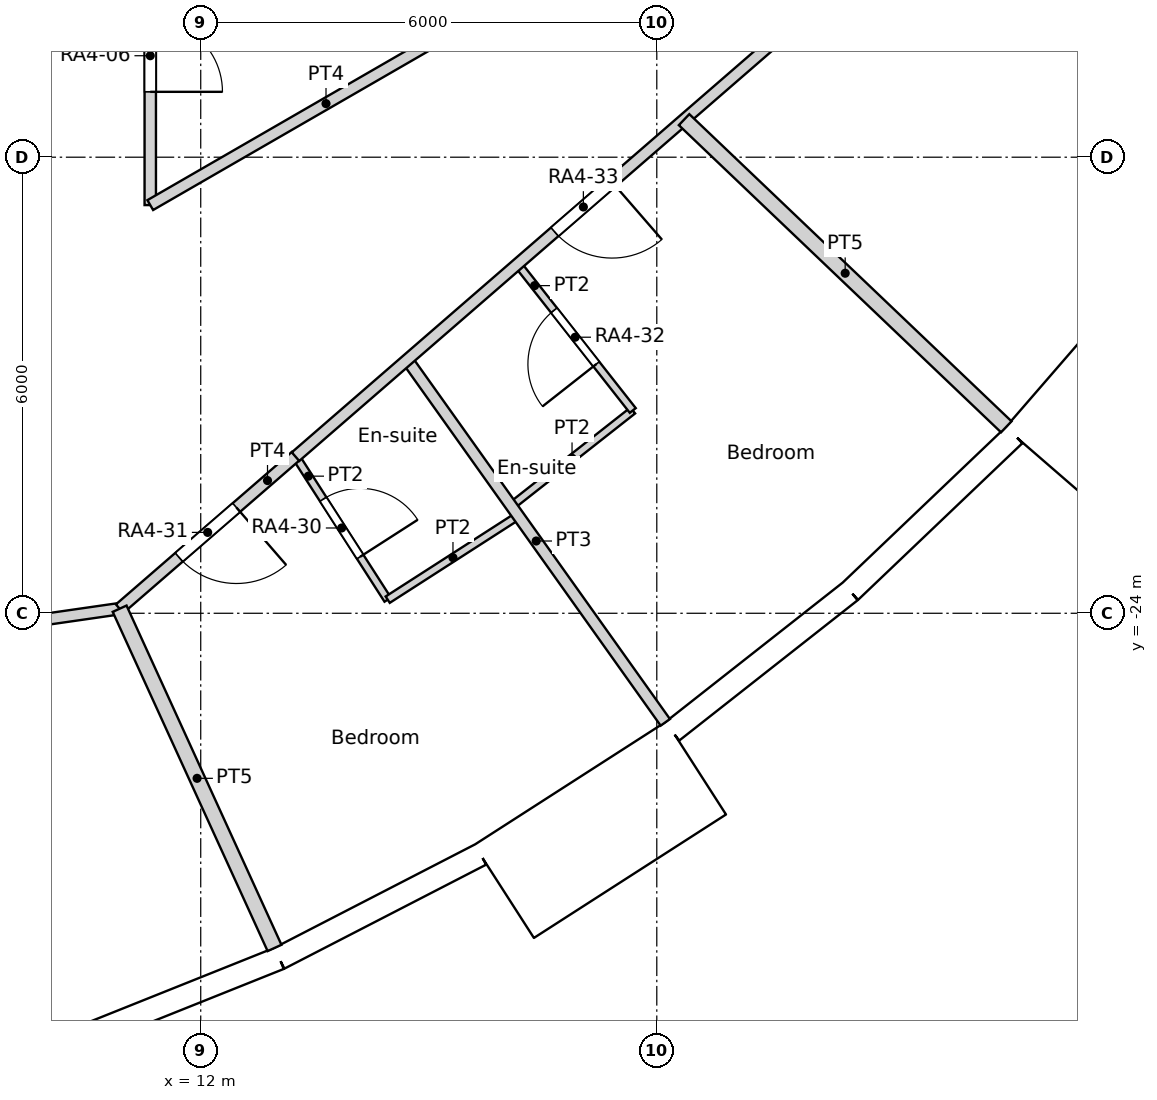
"""IFC4 building model, lengths in metres.
Left out: names, types, materials, properties, quantities, classifications, styles, units other than length and angle.
Written with IfcOpenShell. Run it as: python <this file> out.ifc"""

import sys

from ifc_helpers import new_model, si_unit, direction, frame, frame_2d, origin, origin_2d, place, context, subcontext, project, spatial, rectangle, circle, extrude, element, fill, save


model = new_model("IFC4")
c1 = context("Model", 3, precision=1e-05, world=origin(), true_north=direction((0.0, 1.0)))
c2 = subcontext(c1, "Body", "Model", "MODEL_VIEW")
j1 = project(units=[si_unit("LENGTHUNIT", "METRE"), si_unit("PLANEANGLEUNIT", "RADIAN")], contexts=[c1])
p1 = place(None, origin())
s1 = spatial("IfcSite", under=j1, at=p1, CompositionType="ELEMENT")
p2 = place(p1, origin())
s2 = spatial("IfcBuilding", under=s1, at=p2, CompositionType="ELEMENT")
p3 = place(p2, frame((0.0, 0.0, 60.6)))
s3 = spatial("IfcBuildingStorey", under=s2, at=p3, CompositionType="ELEMENT", Elevation=60.6)
for number, where, z_axis, x_axis in (
    (1, (12.576, -27.539, 0.0), (0.0, 0.0, 1.0), (1.0, 0.0, 0.0)),
    (2, (17.561, -24.661, 0.0), (0.0, 0.0, 1.0), (1.0, 0.0, 0.0)),
    (3, (21.911, -20.892, 0.0), (0.0, 0.0, 1.0), (1.0, 0.0, 0.0)),
):
    element("IfcColumn", number, at=place(p3, frame(where, z_axis=z_axis, x_axis=x_axis)), inside=s3, PredefinedType="COLUMN", context=c2, shape_type="SweptSolid", body=[
        extrude(circle(Radius=0.7, at=origin_2d()), origin(), (0.0, 0.0, 1.0), 3.6),
    ])
for number, where, z_axis, x_axis in (
    (4, (9.723, -22.54, 0.0), (0.0, 0.0, 1.0), (1.0, 0.0, 0.0)),
    (5, (14.659, -19.69, 0.0), (0.0, 0.0, 1.0), (1.0, 0.0, 0.0)),
):
    element("IfcColumn", number, at=place(p3, frame(where, z_axis=z_axis, x_axis=x_axis)), inside=s3, PredefinedType="COLUMN", context=c2, shape_type="SweptSolid", body=[
        extrude(circle(Radius=0.75, at=origin_2d()), origin(), (0.0, 0.0, 1.0), 3.6),
    ])
p4 = place(p3, frame((10.267, -29.646, 0.0), z_axis=(0.0, 0.0, 1.0), x_axis=(0.928403213937, 0.371574316054, 0.0)))
e6 = element("IfcWall", 6, at=p4, inside=s3, PredefinedType="SOLIDWALL", context=c2, shape_type="SweptSolid", body=[
    extrude(rectangle(XDim=2.98, YDim=0.3, at=frame_2d((1.49, 0.0))), origin(), (0.0, 0.0, 1.0), 2.65),
])
p5 = place(p4, frame((1.49, 0.0, 1.55)))
e7 = element("IfcOpeningElement", 7, at=p5, cuts=e6, PredefinedType="OPENING", context=c2, shape_type="SweptSolid", body=[
    extrude(circle(Radius=0.9, at=origin_2d()), frame((0.0, 0.16, 0.0), z_axis=(0.0, -1.0, 0.0), x_axis=(1.0, 0.0, 0.0)), (0.0, 0.0, 1.0), 0.32),
])
p6 = place(p3, frame((13.033, -28.539, 0.0), z_axis=(0.0, 0.0, 1.0), x_axis=(0.888819853856, 0.458256770153, 0.0)))
e8 = element("IfcWall", 8, at=p6, inside=s3, PredefinedType="SOLIDWALL", context=c2, shape_type="SweptSolid", body=[
    extrude(rectangle(XDim=2.98, YDim=0.3, at=frame_2d((1.49, 0.0))), origin(), (0.0, 0.0, 1.0), 3.15),
])
p7 = place(p6, frame((1.49, 0.0, 1.55)))
e9 = element("IfcOpeningElement", 9, at=p7, cuts=e8, PredefinedType="OPENING", context=c2, shape_type="SweptSolid", body=[
    extrude(circle(Radius=0.9, at=origin_2d()), frame((0.0, 0.16, 0.0), z_axis=(0.0, -1.0, 0.0), x_axis=(1.0, 0.0, 0.0)), (0.0, 0.0, 1.0), 0.32),
])
p8 = place(p3, frame((15.992, -27.659, -0.45), z_axis=(0.0, 0.0, 1.0), x_axis=(0.841223422347, 0.540687667415, 0.0)))
e10 = element("IfcWall", 10, at=p8, inside=s3, PredefinedType="ELEMENTEDWALL", context=c2, shape_type="SweptSolid", body=[
    extrude(rectangle(XDim=3.0, YDim=1.45, at=frame_2d((1.5, 0.0))), origin(), (0.0, 0.0, 1.0), 3.6),
])
p9 = place(p8, frame((1.5, 0.0, 2.0)))
e11 = element("IfcOpeningElement", 11, at=p9, cuts=e10, PredefinedType="OPENING", context=c2, shape_type="SweptSolid", body=[
    extrude(circle(Radius=0.9, at=origin_2d()), frame((0.0, 0.735, 0.0), z_axis=(0.0, -1.0, 0.0), x_axis=(1.0, 0.0, 0.0)), (0.0, 0.0, 1.0), 1.47),
])
p10 = place(p3, frame((18.204, -25.553, 0.0), z_axis=(0.0, 0.0, 1.0), x_axis=(0.786045331304, 0.618168858108, 0.0)))
e12 = element("IfcWall", 12, at=p10, inside=s3, PredefinedType="SOLIDWALL", context=c2, shape_type="SweptSolid", body=[
    extrude(rectangle(XDim=2.98, YDim=0.3, at=frame_2d((1.49, 0.0))), origin(), (0.0, 0.0, 1.0), 2.65),
])
p11 = place(p10, frame((1.49, 0.0, 1.55)))
e13 = element("IfcOpeningElement", 13, at=p11, cuts=e12, PredefinedType="OPENING", context=c2, shape_type="SweptSolid", body=[
    extrude(circle(Radius=0.9, at=origin_2d()), frame((0.0, 0.16, 0.0), z_axis=(0.0, -1.0, 0.0), x_axis=(1.0, 0.0, 0.0)), (0.0, 0.0, 1.0), 0.32),
])
p12 = place(p3, frame((20.546, -23.711, 0.0), z_axis=(0.0, 0.0, 1.0), x_axis=(0.723744206617, 0.690068346896, 0.0)))
e14 = element("IfcWall", 14, at=p12, inside=s3, PredefinedType="SOLIDWALL", context=c2, shape_type="SweptSolid", body=[
    extrude(rectangle(XDim=2.98, YDim=0.3, at=frame_2d((1.49, 0.0))), origin(), (0.0, 0.0, 1.0), 3.15),
])
p13 = place(p12, frame((1.49, 0.0, 1.55)))
e15 = element("IfcOpeningElement", 15, at=p13, cuts=e14, PredefinedType="OPENING", context=c2, shape_type="SweptSolid", body=[
    extrude(circle(Radius=0.9, at=origin_2d()), frame((0.0, 0.16, 0.0), z_axis=(0.0, -1.0, 0.0), x_axis=(1.0, 0.0, 0.0)), (0.0, 0.0, 1.0), 0.32),
])
p14 = place(p3, frame((23.137, -22.033, -0.45), z_axis=(0.0, 0.0, 1.0), x_axis=(0.654890259022, 0.75572398972, 0.0)))
e16 = element("IfcWall", 16, at=p14, inside=s3, PredefinedType="ELEMENTEDWALL", context=c2, shape_type="SweptSolid", body=[
    extrude(rectangle(XDim=3.0, YDim=1.45, at=frame_2d((1.5, 0.0))), origin(), (0.0, 0.0, 1.0), 3.6),
])
p15 = place(p14, frame((1.5, 0.0, 2.0)))
e17 = element("IfcOpeningElement", 17, at=p15, cuts=e16, PredefinedType="OPENING", context=c2, shape_type="SweptSolid", body=[
    extrude(circle(Radius=0.9, at=origin_2d()), frame((0.0, 0.735, 0.0), z_axis=(0.0, -1.0, 0.0), x_axis=(1.0, 0.0, 0.0)), (0.0, 0.0, 1.0), 1.47),
])
p16 = place(p3, frame((13.247, -21.939, 0.0), z_axis=(0.0, 0.0, 1.0), x_axis=(0.755420750547, 0.655240024451, 0.0)))
e18 = element("IfcWall", 18, at=p16, inside=s3, PredefinedType="PARTITIONING", context=c2, shape_type="SweptSolid", body=[
    extrude(rectangle(XDim=11.771, YDim=0.15, at=frame_2d((5.885, 0.0))), origin(), (0.0, 0.0, 1.0), 3.15),
])
p17 = place(p16, frame((4.513, 0.0, 0.0)))
e19 = element("IfcOpeningElement", 19, at=p17, cuts=e18, PredefinedType="OPENING", context=c2, shape_type="SweptSolid", body=[
    extrude(rectangle(XDim=1.0, YDim=2.1, at=frame_2d((0.5, 1.05))), frame((0.0, 0.075, 0.0), z_axis=(0.0, -1.0, 0.0), x_axis=(1.0, 0.0, 0.0)), (0.0, 0.0, 1.0), 0.15),
])
p18 = place(p3, frame((11.336, -18.63, 0.0), z_axis=(0.0, 0.0, 1.0), x_axis=(0.0, 1.0, 0.0)))
e20 = element("IfcWall", 20, at=p18, inside=s3, PredefinedType="PARTITIONING", context=c2, shape_type="SweptSolid", body=[
    extrude(rectangle(XDim=6.83, YDim=0.15, at=frame_2d((3.415, 0.0))), origin(), (0.0, 0.0, 1.0), 3.15),
])
p19 = place(p18, frame((1.49, 0.0, 0.0)))
e21 = element("IfcOpeningElement", 21, at=p19, cuts=e20, PredefinedType="OPENING", context=c2, shape_type="SweptSolid", body=[
    extrude(rectangle(XDim=0.95, YDim=2.1, at=frame_2d((0.475, 1.05))), frame((0.0, 0.075, 0.0), z_axis=(0.0, -1.0, 0.0), x_axis=(1.0, 0.0, 0.0)), (0.0, 0.0, 1.0), 0.15),
])
p20 = place(p3, frame((11.336, -18.63, 0.0), z_axis=(0.0, 0.0, 1.0), x_axis=(0.866056911224, 0.499945423543, 0.0)))
e22 = element("IfcWall", 22, at=p20, inside=s3, PredefinedType="PARTITIONING", context=c2, shape_type="SweptSolid", body=[
    extrude(rectangle(XDim=5.339, YDim=0.15, at=frame_2d((2.67, 0.0))), origin(), (0.0, 0.0, 1.0), 3.15),
])
p21 = place(p3, frame((-3.746, -26.051, 0.0), z_axis=(0.0, 0.0, 1.0), x_axis=(0.9898137179, 0.142368549395, 0.0)))
e23 = element("IfcWall", 23, at=p21, inside=s3, PredefinedType="PARTITIONING", context=c2, shape_type="SweptSolid", body=[
    extrude(rectangle(XDim=14.83, YDim=0.15, at=frame_2d((7.415, 0.0))), origin(), (0.0, 0.0, 1.0), 3.15),
])
p22 = place(p21, frame((9.415, 0.0, 0.0)))
e24 = element("IfcOpeningElement", 24, at=p22, cuts=e23, PredefinedType="OPENING", context=c2, shape_type="SweptSolid", body=[
    extrude(rectangle(XDim=1.5, YDim=2.1, at=frame_2d((0.75, 1.05))), frame((0.0, 0.075, 0.0), z_axis=(0.0, -1.0, 0.0), x_axis=(1.0, 0.0, 0.0)), (0.0, 0.0, 1.0), 0.15),
])
p23 = place(p3, frame((10.933, -23.94, 0.0), z_axis=(0.0, 0.0, 1.0), x_axis=(0.755675945931, 0.654945696025, 0.0)))
e25 = element("IfcWall", 25, at=p23, inside=s3, PredefinedType="PARTITIONING", context=c2, shape_type="SweptSolid", body=[
    extrude(rectangle(XDim=3.066, YDim=0.15, at=frame_2d((1.533, 0.0))), origin(), (0.0, 0.0, 1.0), 3.15),
])
p24 = place(p23, frame((1.033, 0.0, 0.0)))
e26 = element("IfcOpeningElement", 26, at=p24, cuts=e25, PredefinedType="OPENING", context=c2, shape_type="SweptSolid", body=[
    extrude(rectangle(XDim=1.0, YDim=2.1, at=frame_2d((0.5, 1.05))), frame((0.0, 0.075, 0.0), z_axis=(0.0, -1.0, 0.0), x_axis=(1.0, 0.0, 0.0)), (0.0, 0.0, 1.0), 0.15),
])
p25 = place(p3, frame((10.933, -23.94, 0.0), z_axis=(0.0, 0.0, 1.0), x_axis=(0.415346954488, -0.909663073559, 0.0)))
e27 = element("IfcWall", 27, at=p25, inside=s3, PredefinedType="PARTITIONING", context=c2, shape_type="SweptSolid", body=[
    extrude(rectangle(XDim=4.906, YDim=0.2, at=frame_2d((2.453, 0.0))), origin(), (0.0, 0.0, 1.0), 3.15),
])
p26 = place(p3, frame((13.248, -21.935, 0.0), z_axis=(0.0, 0.0, 1.0), x_axis=(0.540597960994, -0.841281073464, 0.0)))
e28 = element("IfcWall", 28, at=p26, inside=s3, PredefinedType="PARTITIONING", context=c2, shape_type="SweptSolid", body=[
    extrude(rectangle(XDim=2.242, YDim=0.1, at=frame_2d((1.121, 0.0))), origin(), (0.0, 0.0, 1.0), 3.15),
])
p27 = place(p26, frame((0.671, 0.0, 0.0)))
e29 = element("IfcOpeningElement", 29, at=p27, cuts=e28, PredefinedType="OPENING", context=c2, shape_type="SweptSolid", body=[
    extrude(rectangle(XDim=0.9, YDim=2.04, at=frame_2d((0.45, 1.02))), frame((0.0, 0.05, 0.0), z_axis=(0.0, -1.0, 0.0), x_axis=(1.0, 0.0, 0.0)), (0.0, 0.0, 1.0), 0.1),
])
p28 = place(p3, frame((14.46, -23.821, 0.0), z_axis=(0.0, 0.0, 1.0), x_axis=(0.841135728185, 0.540824081168, 0.0)))
e30 = element("IfcWall", 30, at=p28, inside=s3, PredefinedType="PARTITIONING", context=c2, shape_type="SweptSolid", body=[
    extrude(rectangle(XDim=2.041, YDim=0.1, at=frame_2d((1.021, 0.0))), origin(), (0.0, 0.0, 1.0), 3.15),
])
p29 = place(p3, frame((14.715, -20.664, 0.0), z_axis=(0.0, 0.0, 1.0), x_axis=(0.57995989616, -0.814645026282, 0.0)))
e31 = element("IfcWall", 31, at=p29, inside=s3, PredefinedType="PARTITIONING", context=c2, shape_type="SweptSolid", body=[
    extrude(rectangle(XDim=5.857, YDim=0.15, at=frame_2d((2.928, 0.0))), origin(), (0.0, 0.0, 1.0), 3.15),
])
p30 = place(p3, frame((16.086, -22.589, 0.0), z_axis=(0.0, 0.0, 1.0), x_axis=(0.785984904201, 0.618245687707, 0.0)))
e32 = element("IfcWall", 32, at=p30, inside=s3, PredefinedType="PARTITIONING", context=c2, shape_type="SweptSolid", body=[
    extrude(rectangle(XDim=2.033, YDim=0.1, at=frame_2d((1.017, 0.0))), origin(), (0.0, 0.0, 1.0), 3.15),
])
p31 = place(p3, frame((16.168, -19.404, 0.0), z_axis=(0.0, 0.0, 1.0), x_axis=(0.618142414415, -0.786066126672, 0.0)))
e33 = element("IfcWall", 33, at=p31, inside=s3, PredefinedType="PARTITIONING", context=c2, shape_type="SweptSolid", body=[
    extrude(rectangle(XDim=2.453, YDim=0.1, at=frame_2d((1.226, 0.0))), origin(), (0.0, 0.0, 1.0), 3.15),
])
p32 = place(p31, frame((0.777, 0.0, 0.0)))
e34 = element("IfcOpeningElement", 34, at=p32, cuts=e33, PredefinedType="OPENING", context=c2, shape_type="SweptSolid", body=[
    extrude(rectangle(XDim=0.9, YDim=2.04, at=frame_2d((0.45, 1.02))), frame((0.0, 0.05, 0.0), z_axis=(0.0, -1.0, 0.0), x_axis=(1.0, 0.0, 0.0)), (0.0, 0.0, 1.0), 0.1),
])
p33 = place(p3, frame((18.359, -17.506, 0.0), z_axis=(0.0, 0.0, 1.0), x_axis=(0.723808715798, -0.690000683286, 0.0)))
e35 = element("IfcWall", 35, at=p33, inside=s3, PredefinedType="PARTITIONING", context=c2, shape_type="SweptSolid", body=[
    extrude(rectangle(XDim=5.856, YDim=0.2, at=frame_2d((2.928, 0.0))), origin(), (0.0, 0.0, 1.0), 3.15),
])
p34 = place(p5, origin())
e36 = element("IfcWindow", 36, at=p34, inside=s3, PartitioningType="SINGLE_PANEL", PredefinedType="WINDOW", context=c2, shape_type="SweptSolid", body=[
    extrude(circle(Radius=0.9, at=origin_2d()), frame((0.0, 0.12, 0.0), z_axis=(0.0, -1.0, 0.0), x_axis=(1.0, 0.0, 0.0)), (0.0, 0.0, 1.0), 0.1),
])
fill(e7, e36)
p35 = place(p7, origin())
e37 = element("IfcWindow", 37, at=p35, inside=s3, PartitioningType="SINGLE_PANEL", PredefinedType="WINDOW", context=c2, shape_type="SweptSolid", body=[
    extrude(circle(Radius=0.9, at=origin_2d()), frame((0.0, 0.12, 0.0), z_axis=(0.0, -1.0, 0.0), x_axis=(1.0, 0.0, 0.0)), (0.0, 0.0, 1.0), 0.1),
])
fill(e9, e37)
p36 = place(p9, origin())
e38 = element("IfcWindow", 38, at=p36, inside=s3, PartitioningType="SINGLE_PANEL", PredefinedType="WINDOW", context=c2, shape_type="SweptSolid", body=[
    extrude(circle(Radius=0.9, at=origin_2d()), frame((0.0, 0.695, 0.0), z_axis=(0.0, -1.0, 0.0), x_axis=(1.0, 0.0, 0.0)), (0.0, 0.0, 1.0), 0.1),
])
fill(e11, e38)
p37 = place(p11, origin())
e39 = element("IfcWindow", 39, at=p37, inside=s3, PartitioningType="SINGLE_PANEL", PredefinedType="WINDOW", context=c2, shape_type="SweptSolid", body=[
    extrude(circle(Radius=0.9, at=origin_2d()), frame((0.0, 0.12, 0.0), z_axis=(0.0, -1.0, 0.0), x_axis=(1.0, 0.0, 0.0)), (0.0, 0.0, 1.0), 0.1),
])
fill(e13, e39)
p38 = place(p13, origin())
e40 = element("IfcWindow", 40, at=p38, inside=s3, PartitioningType="SINGLE_PANEL", PredefinedType="WINDOW", context=c2, shape_type="SweptSolid", body=[
    extrude(circle(Radius=0.9, at=origin_2d()), frame((0.0, 0.12, 0.0), z_axis=(0.0, -1.0, 0.0), x_axis=(1.0, 0.0, 0.0)), (0.0, 0.0, 1.0), 0.1),
])
fill(e15, e40)
p39 = place(p15, origin())
e41 = element("IfcWindow", 41, at=p39, inside=s3, PartitioningType="SINGLE_PANEL", PredefinedType="WINDOW", context=c2, shape_type="SweptSolid", body=[
    extrude(circle(Radius=0.9, at=origin_2d()), frame((0.0, 0.695, 0.0), z_axis=(0.0, -1.0, 0.0), x_axis=(1.0, 0.0, 0.0)), (0.0, 0.0, 1.0), 0.1),
])
fill(e17, e41)
p40 = place(p19, origin())
e42 = element("IfcDoor", 42, at=p40, inside=s3, OperationType="SINGLE_SWING_RIGHT", PredefinedType="DOOR", context=c2, shape_type="SweptSolid", body=[
    extrude(rectangle(XDim=0.95, YDim=2.1, at=frame_2d((0.475, 1.05))), frame((0.0, 0.025, 0.0), z_axis=(0.0, -1.0, 0.0), x_axis=(1.0, 0.0, 0.0)), (0.0, 0.0, 1.0), 0.05),
])
fill(e21, e42)
p41 = place(p27, origin())
e43 = element("IfcDoor", 43, at=p41, inside=s3, OperationType="SINGLE_SWING_RIGHT", PredefinedType="DOOR", context=c2, shape_type="SweptSolid", body=[
    extrude(rectangle(XDim=0.9, YDim=2.04, at=frame_2d((0.45, 1.02))), frame((0.0, 0.025, 0.0), z_axis=(0.0, -1.0, 0.0), x_axis=(1.0, 0.0, 0.0)), (0.0, 0.0, 1.0), 0.05),
])
fill(e29, e43)
p42 = place(p24, origin())
e44 = element("IfcDoor", 44, at=p42, inside=s3, OperationType="SINGLE_SWING_LEFT", PredefinedType="DOOR", context=c2, shape_type="SweptSolid", body=[
    extrude(rectangle(XDim=1.0, YDim=2.1, at=frame_2d((0.5, 1.05))), frame((0.0, 0.025, 0.0), z_axis=(0.0, -1.0, 0.0), x_axis=(1.0, 0.0, 0.0)), (0.0, 0.0, 1.0), 0.05),
])
fill(e26, e44)
p43 = place(p32, origin())
e45 = element("IfcDoor", 45, at=p43, inside=s3, OperationType="SINGLE_SWING_LEFT", PredefinedType="DOOR", context=c2, shape_type="SweptSolid", body=[
    extrude(rectangle(XDim=0.9, YDim=2.04, at=frame_2d((0.45, 1.02))), frame((0.0, 0.025, 0.0), z_axis=(0.0, -1.0, 0.0), x_axis=(1.0, 0.0, 0.0)), (0.0, 0.0, 1.0), 0.05),
])
fill(e34, e45)
p44 = place(p17, origin())
e46 = element("IfcDoor", 46, at=p44, inside=s3, OperationType="SINGLE_SWING_LEFT", PredefinedType="DOOR", context=c2, shape_type="SweptSolid", body=[
    extrude(rectangle(XDim=1.0, YDim=2.1, at=frame_2d((0.5, 1.05))), frame((0.0, 0.025, 0.0), z_axis=(0.0, -1.0, 0.0), x_axis=(1.0, 0.0, 0.0)), (0.0, 0.0, 1.0), 0.05),
])
fill(e19, e46)
save(model, sys.argv[1])
